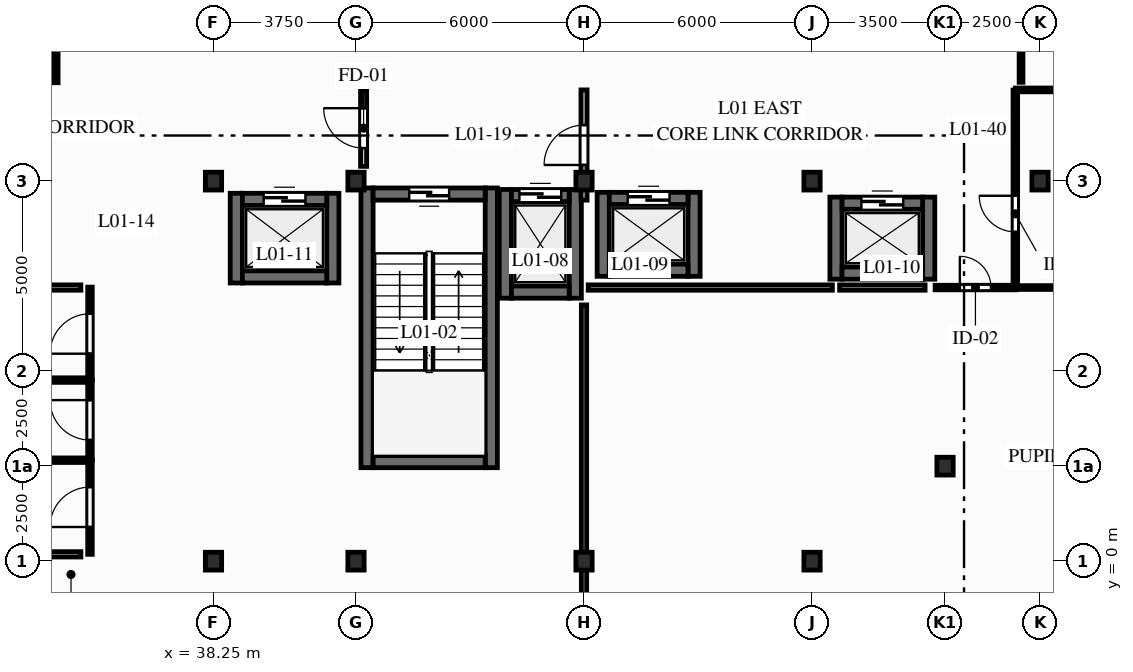
"""IFC4 building model, lengths in metres.
Left out: names, types, materials, properties, quantities, classifications, styles, units other than length and angle.
Written with IfcOpenShell. Run it as: python <this file> out.ifc"""

import sys

from ifc_helpers import new_model, si_unit, direction, frame, frame_2d, origin, origin_2d, place, context, subcontext, project, spatial, rectangle, i_section, extrude, element, fill, save


model = new_model("IFC4")
c1 = context("Model", 3, precision=1e-05, world=origin(), true_north=direction((0.0, 1.0)))
c2 = subcontext(c1, "Body", "Model", "MODEL_VIEW")
j1 = project(units=[si_unit("LENGTHUNIT", "METRE"), si_unit("PLANEANGLEUNIT", "RADIAN")], contexts=[c1])
p1 = place(None, origin())
s1 = spatial("IfcSite", under=j1, at=p1, CompositionType="ELEMENT")
p2 = place(p1, origin())
s2 = spatial("IfcBuilding", under=s1, at=p2, CompositionType="ELEMENT")
p3 = place(p2, frame((0.0, 0.0, 4.5)))
s3 = spatial("IfcBuildingStorey", under=s2, at=p3, CompositionType="ELEMENT", Elevation=4.5)
for number, where, z_axis, x_axis in (
    (1, (38.25, 0.0, 0.0), (0.0, 0.0, 1.0), (1.0, 0.0, 0.0)),
    (2, (38.25, 10.0, 0.0), (0.0, 0.0, 1.0), (1.0, 0.0, 0.0)),
    (3, (42.0, 0.0, 0.0), (0.0, 0.0, 1.0), (1.0, 0.0, 0.0)),
    (4, (42.0, 10.0, 0.0), (0.0, 0.0, 1.0), (1.0, 0.0, 0.0)),
    (5, (48.0, 0.0, 0.0), (0.0, 0.0, 1.0), (1.0, 0.0, 0.0)),
    (6, (48.0, 10.0, 0.0), (0.0, 0.0, 1.0), (1.0, 0.0, 0.0)),
    (7, (54.0, 0.0, 0.0), (0.0, 0.0, 1.0), (1.0, 0.0, 0.0)),
    (8, (54.0, 10.0, 0.0), (0.0, 0.0, 1.0), (1.0, 0.0, 0.0)),
    (9, (57.5, 2.5, 0.0), (0.0, 0.0, 1.0), (1.0, 0.0, 0.0)),
    (10, (60.0, 10.0, 0.0), (0.0, 0.0, 1.0), (1.0, 0.0, 0.0)),
):
    element("IfcColumn", number, at=place(p3, frame(where, z_axis=z_axis, x_axis=x_axis)), inside=s3, PredefinedType="COLUMN", context=c2, shape_type="SweptSolid", body=[
        extrude(i_section(OverallWidth=0.428, OverallDepth=0.469, WebThickness=0.078, FlangeThickness=0.125, FilletRadius=0.015, at=origin_2d()), origin(), (0.0, 0.0, 1.0), 4.5),
    ])
for number, where, z_axis, x_axis in (
    (11, (42.29, 2.46, 0.0), (0.0, 0.0, 1.0), (0.0, 1.0, 0.0)),
    (12, (45.56, 2.46, 0.0), (0.0, 0.0, 1.0), (0.0, 1.0, 0.0)),
):
    element("IfcWall", number, at=place(p3, frame(where, z_axis=z_axis, x_axis=x_axis)), inside=s3, PredefinedType="SHEAR", context=c2, shape_type="SweptSolid", body=[
        extrude(rectangle(XDim=7.36, YDim=0.32, at=frame_2d((3.68, 0.0))), origin(), (0.0, 0.0, 1.0), 4.22),
    ])
p4 = place(p3, frame((42.45, 2.62, 0.0), z_axis=(0.0, 0.0, 1.0), x_axis=(1.0, 0.0, 0.0)))
e13 = element("IfcWall", 13, at=p4, inside=s3, PredefinedType="SHEAR", context=c2, shape_type="SweptSolid", body=[
    extrude(rectangle(XDim=2.95, YDim=0.32, at=frame_2d((1.475, 0.0))), origin(), (0.0, 0.0, 1.0), 4.22),
])
p5 = place(p3, frame((45.4, 9.66, 0.0), z_axis=(0.0, 0.0, 1.0), x_axis=(-1.0, 0.0, 0.0)))
e14 = element("IfcWall", 14, at=p5, inside=s3, PredefinedType="SHEAR", context=c2, shape_type="SweptSolid", body=[
    extrude(rectangle(XDim=2.95, YDim=0.32, at=frame_2d((1.475, 0.0))), origin(), (0.0, 0.0, 1.0), 4.22),
])
p6 = place(p5, frame((0.95, 0.0, 0.0)))
e15 = element("IfcOpeningElement", 15, at=p6, cuts=e14, PredefinedType="OPENING", context=c2, shape_type="SweptSolid", body=[
    extrude(rectangle(XDim=1.05, YDim=2.06, at=frame_2d((0.525, 1.03))), frame((0.0, 0.17, 0.0), z_axis=(0.0, -1.0, 0.0), x_axis=(1.0, 0.0, 0.0)), (0.0, 0.0, 1.0), 0.34),
])
for number, where, z_axis, x_axis in (
    (16, (45.93, 6.92, 0.0), (0.0, 0.0, 1.0), (0.0, 1.0, 0.0)),
    (17, (47.77, 6.92, 0.0), (0.0, 0.0, 1.0), (0.0, 1.0, 0.0)),
):
    element("IfcWall", number, at=place(p3, frame(where, z_axis=z_axis, x_axis=x_axis)), inside=s3, PredefinedType="SHEAR", context=c2, shape_type="SweptSolid", body=[
        extrude(rectangle(XDim=2.86, YDim=0.32, at=frame_2d((1.43, 0.0))), origin(), (0.0, 0.0, 1.0), 4.22),
    ])
p7 = place(p3, frame((46.09, 7.08, 0.0), z_axis=(0.0, 0.0, 1.0), x_axis=(1.0, 0.0, 0.0)))
e18 = element("IfcWall", 18, at=p7, inside=s3, PredefinedType="SHEAR", context=c2, shape_type="SweptSolid", body=[
    extrude(rectangle(XDim=1.52, YDim=0.32, at=frame_2d((0.76, 0.0))), origin(), (0.0, 0.0, 1.0), 4.22),
])
p8 = place(p3, frame((46.09, 9.62, 0.0), z_axis=(0.0, 0.0, 1.0), x_axis=(1.0, 0.0, 0.0)))
e19 = element("IfcWall", 19, at=p8, inside=s3, PredefinedType="SHEAR", context=c2, shape_type="SweptSolid", body=[
    extrude(rectangle(XDim=1.52, YDim=0.32, at=frame_2d((0.76, 0.0))), origin(), (0.0, 0.0, 1.0), 4.22),
])
p9 = place(p8, frame((0.21, 0.0, 0.0)))
e20 = element("IfcOpeningElement", 20, at=p9, cuts=e19, PredefinedType="OPENING", context=c2, shape_type="SweptSolid", body=[
    extrude(rectangle(XDim=1.1, YDim=2.06, at=frame_2d((0.55, 1.03))), frame((0.0, 0.17, 0.0), z_axis=(0.0, -1.0, 0.0), x_axis=(1.0, 0.0, 0.0)), (0.0, 0.0, 1.0), 0.34),
])
for number, where, z_axis, x_axis in (
    (21, (48.505, 7.495, 0.0), (0.0, 0.0, 1.0), (0.0, 1.0, 0.0)),
    (22, (50.895, 7.495, 0.0), (0.0, 0.0, 1.0), (0.0, 1.0, 0.0)),
):
    element("IfcWall", number, at=place(p3, frame(where, z_axis=z_axis, x_axis=x_axis)), inside=s3, PredefinedType="SHEAR", context=c2, shape_type="SweptSolid", body=[
        extrude(rectangle(XDim=2.21, YDim=0.32, at=frame_2d((1.105, 0.0))), origin(), (0.0, 0.0, 1.0), 4.22),
    ])
p10 = place(p3, frame((48.665, 7.655, 0.0), z_axis=(0.0, 0.0, 1.0), x_axis=(1.0, 0.0, 0.0)))
e23 = element("IfcWall", 23, at=p10, inside=s3, PredefinedType="SHEAR", context=c2, shape_type="SweptSolid", body=[
    extrude(rectangle(XDim=2.07, YDim=0.32, at=frame_2d((1.035, 0.0))), origin(), (0.0, 0.0, 1.0), 4.22),
])
p11 = place(p3, frame((48.665, 9.545, 0.0), z_axis=(0.0, 0.0, 1.0), x_axis=(1.0, 0.0, 0.0)))
e24 = element("IfcWall", 24, at=p11, inside=s3, PredefinedType="SHEAR", context=c2, shape_type="SweptSolid", body=[
    extrude(rectangle(XDim=2.07, YDim=0.32, at=frame_2d((1.035, 0.0))), origin(), (0.0, 0.0, 1.0), 4.22),
])
p12 = place(p11, frame((0.485, 0.0, 0.0)))
e25 = element("IfcOpeningElement", 25, at=p12, cuts=e24, PredefinedType="OPENING", context=c2, shape_type="SweptSolid", body=[
    extrude(rectangle(XDim=1.1, YDim=2.06, at=frame_2d((0.55, 1.03))), frame((0.0, 0.17, 0.0), z_axis=(0.0, -1.0, 0.0), x_axis=(1.0, 0.0, 0.0)), (0.0, 0.0, 1.0), 0.34),
])
for number, where, z_axis, x_axis in (
    (26, (54.63, 7.42, 0.0), (0.0, 0.0, 1.0), (0.0, 1.0, 0.0)),
    (27, (57.07, 7.42, 0.0), (0.0, 0.0, 1.0), (0.0, 1.0, 0.0)),
):
    element("IfcWall", number, at=place(p3, frame(where, z_axis=z_axis, x_axis=x_axis)), inside=s3, PredefinedType="SHEAR", context=c2, shape_type="SweptSolid", body=[
        extrude(rectangle(XDim=2.16, YDim=0.32, at=frame_2d((1.08, 0.0))), origin(), (0.0, 0.0, 1.0), 4.22),
    ])
p13 = place(p3, frame((54.79, 7.58, 0.0), z_axis=(0.0, 0.0, 1.0), x_axis=(1.0, 0.0, 0.0)))
e28 = element("IfcWall", 28, at=p13, inside=s3, PredefinedType="SHEAR", context=c2, shape_type="SweptSolid", body=[
    extrude(rectangle(XDim=2.12, YDim=0.32, at=frame_2d((1.06, 0.0))), origin(), (0.0, 0.0, 1.0), 4.22),
])
p14 = place(p3, frame((54.79, 9.42, 0.0), z_axis=(0.0, 0.0, 1.0), x_axis=(1.0, 0.0, 0.0)))
e29 = element("IfcWall", 29, at=p14, inside=s3, PredefinedType="SHEAR", context=c2, shape_type="SweptSolid", body=[
    extrude(rectangle(XDim=2.12, YDim=0.32, at=frame_2d((1.06, 0.0))), origin(), (0.0, 0.0, 1.0), 4.22),
])
p15 = place(p14, frame((0.51, 0.0, 0.0)))
e30 = element("IfcOpeningElement", 30, at=p15, cuts=e29, PredefinedType="OPENING", context=c2, shape_type="SweptSolid", body=[
    extrude(rectangle(XDim=1.1, YDim=2.06, at=frame_2d((0.55, 1.03))), frame((0.0, 0.17, 0.0), z_axis=(0.0, -1.0, 0.0), x_axis=(1.0, 0.0, 0.0)), (0.0, 0.0, 1.0), 0.34),
])
for number, where, z_axis, x_axis in (
    (31, (38.85, 7.32, 0.0), (0.0, 0.0, 1.0), (0.0, 1.0, 0.0)),
    (32, (41.39, 7.32, 0.0), (0.0, 0.0, 1.0), (0.0, 1.0, 0.0)),
):
    element("IfcWall", number, at=place(p3, frame(where, z_axis=z_axis, x_axis=x_axis)), inside=s3, PredefinedType="SHEAR", context=c2, shape_type="SweptSolid", body=[
        extrude(rectangle(XDim=2.36, YDim=0.32, at=frame_2d((1.18, 0.0))), origin(), (0.0, 0.0, 1.0), 4.22),
    ])
p16 = place(p3, frame((39.01, 7.48, 0.0), z_axis=(0.0, 0.0, 1.0), x_axis=(1.0, 0.0, 0.0)))
e33 = element("IfcWall", 33, at=p16, inside=s3, PredefinedType="SHEAR", context=c2, shape_type="SweptSolid", body=[
    extrude(rectangle(XDim=2.22, YDim=0.32, at=frame_2d((1.11, 0.0))), origin(), (0.0, 0.0, 1.0), 4.22),
])
p17 = place(p3, frame((39.01, 9.52, 0.0), z_axis=(0.0, 0.0, 1.0), x_axis=(1.0, 0.0, 0.0)))
e34 = element("IfcWall", 34, at=p17, inside=s3, PredefinedType="SHEAR", context=c2, shape_type="SweptSolid", body=[
    extrude(rectangle(XDim=2.22, YDim=0.32, at=frame_2d((1.11, 0.0))), origin(), (0.0, 0.0, 1.0), 4.22),
])
p18 = place(p17, frame((0.56, 0.0, 0.0)))
e35 = element("IfcOpeningElement", 35, at=p18, cuts=e34, PredefinedType="OPENING", context=c2, shape_type="SweptSolid", body=[
    extrude(rectangle(XDim=1.1, YDim=2.06, at=frame_2d((0.55, 1.03))), frame((0.0, 0.17, 0.0), z_axis=(0.0, -1.0, 0.0), x_axis=(1.0, 0.0, 0.0)), (0.0, 0.0, 1.0), 0.34),
])
p19 = place(p3, frame((35.0, 0.18, 0.0), z_axis=(0.0, 0.0, 1.0), x_axis=(0.0, 1.0, 0.0)))
e36 = element("IfcWall", 36, at=p19, inside=s3, PredefinedType="PARTITIONING", context=c2, shape_type="SweptSolid", body=[
    extrude(rectangle(XDim=2.488, YDim=0.12, at=frame_2d((1.244, 0.0))), origin(), (0.0, 0.0, 1.0), 4.22),
])
p20 = place(p19, frame((0.719, 0.0, 0.0)))
e37 = element("IfcOpeningElement", 37, at=p20, cuts=e36, PredefinedType="OPENING", context=c2, shape_type="SweptSolid", body=[
    extrude(rectangle(XDim=1.05, YDim=2.06, at=frame_2d((0.525, 1.03))), frame((0.0, 0.07, 0.0), z_axis=(0.0, -1.0, 0.0), x_axis=(1.0, 0.0, 0.0)), (0.0, 0.0, 1.0), 0.14),
])
p21 = place(p3, frame((35.0, 2.65, 0.0), z_axis=(0.0, 0.0, 1.0), x_axis=(0.0, 1.0, 0.0)))
e38 = element("IfcWall", 38, at=p21, inside=s3, PredefinedType="PARTITIONING", context=c2, shape_type="SweptSolid", body=[
    extrude(rectangle(XDim=2.127, YDim=0.12, at=frame_2d((1.063, 0.0))), origin(), (0.0, 0.0, 1.0), 4.22),
])
p22 = place(p21, frame((0.538, 0.0, 0.0)))
e39 = element("IfcOpeningElement", 39, at=p22, cuts=e38, PredefinedType="OPENING", context=c2, shape_type="SweptSolid", body=[
    extrude(rectangle(XDim=1.05, YDim=2.06, at=frame_2d((0.525, 1.03))), frame((0.0, 0.07, 0.0), z_axis=(0.0, -1.0, 0.0), x_axis=(1.0, 0.0, 0.0)), (0.0, 0.0, 1.0), 0.14),
])
p23 = place(p3, frame((35.0, 4.758, 0.0), z_axis=(0.0, 0.0, 1.0), x_axis=(0.0, 1.0, 0.0)))
e40 = element("IfcWall", 40, at=p23, inside=s3, PredefinedType="PARTITIONING", context=c2, shape_type="SweptSolid", body=[
    extrude(rectangle(XDim=2.453, YDim=0.12, at=frame_2d((1.227, 0.0))), origin(), (0.0, 0.0, 1.0), 3.738),
])
p24 = place(p23, frame((0.702, 0.0, 0.0)))
e41 = element("IfcOpeningElement", 41, at=p24, cuts=e40, PredefinedType="OPENING", context=c2, shape_type="SweptSolid", body=[
    extrude(rectangle(XDim=1.05, YDim=2.06, at=frame_2d((0.525, 1.03))), frame((0.0, 0.07, 0.0), z_axis=(0.0, -1.0, 0.0), x_axis=(1.0, 0.0, 0.0)), (0.0, 0.0, 1.0), 0.14),
])
for number, where, z_axis, x_axis in (
    (42, (21.95, 2.657, 0.0), (0.0, 0.0, 1.0), (1.0, 0.0, 0.0)),
    (43, (21.95, 4.765, 0.0), (0.0, 0.0, 1.0), (1.0, 0.0, 0.0)),
):
    element("IfcWall", number, at=place(p3, frame(where, z_axis=z_axis, x_axis=x_axis)), inside=s3, PredefinedType="PARTITIONING", context=c2, shape_type="SweptSolid", body=[
        extrude(rectangle(XDim=13.046, YDim=0.12, at=frame_2d((6.523, 0.0))), origin(), (0.0, 0.0, 1.0), 4.22),
    ])
p25 = place(p3, frame((42.2, 10.389, 0.0), z_axis=(0.0, 0.0, 1.0), x_axis=(0.0, 1.0, 0.0)))
e44 = element("IfcWall", 44, at=p25, inside=s3, PredefinedType="PARTITIONING", context=c2, shape_type="SweptSolid", body=[
    extrude(rectangle(XDim=2.011, YDim=0.16, at=frame_2d((1.006, 0.0))), origin(), (0.0, 0.0, 1.0), 4.22),
])
p26 = place(p25, frame((0.481, 0.0, 0.0)))
e45 = element("IfcOpeningElement", 45, at=p26, cuts=e44, PredefinedType="OPENING", context=c2, shape_type="SweptSolid", body=[
    extrude(rectangle(XDim=1.05, YDim=2.06, at=frame_2d((0.525, 1.03))), frame((0.0, 0.09, 0.0), z_axis=(0.0, -1.0, 0.0), x_axis=(1.0, 0.0, 0.0)), (0.0, 0.0, 1.0), 0.18),
])
p27 = place(p3, frame((48.0, 9.5, 0.0), z_axis=(0.0, 0.0, 1.0), x_axis=(0.0, 1.0, 0.0)))
e46 = element("IfcWall", 46, at=p27, inside=s3, PredefinedType="PARTITIONING", context=c2, shape_type="SweptSolid", body=[
    extrude(rectangle(XDim=2.9, YDim=0.16, at=frame_2d((1.45, 0.0))), origin(), (0.0, 0.0, 1.0), 3.268),
])
p28 = place(p27, frame((0.925, 0.0, 0.0)))
e47 = element("IfcOpeningElement", 47, at=p28, cuts=e46, PredefinedType="OPENING", context=c2, shape_type="SweptSolid", body=[
    extrude(rectangle(XDim=1.05, YDim=2.06, at=frame_2d((0.525, 1.03))), frame((0.0, 0.09, 0.0), z_axis=(0.0, -1.0, 0.0), x_axis=(1.0, 0.0, 0.0)), (0.0, 0.0, 1.0), 0.18),
])
p29 = place(p3, frame((34.1, 12.589, 0.0), z_axis=(0.0, 0.0, 1.0), x_axis=(0.0, 1.0, 0.0)))
e48 = element("IfcWall", 48, at=p29, inside=s3, PredefinedType="PARTITIONING", context=c2, shape_type="SweptSolid", body=[
    extrude(rectangle(XDim=17.823, YDim=0.12, at=frame_2d((8.911, 0.0))), origin(), (0.0, 0.0, 1.0), 4.22),
])
p30 = place(p29, frame((8.386, 0.0, 0.0)))
e49 = element("IfcOpeningElement", 49, at=p30, cuts=e48, PredefinedType="OPENING", context=c2, shape_type="SweptSolid", body=[
    extrude(rectangle(XDim=1.05, YDim=2.06, at=frame_2d((0.525, 1.03))), frame((0.0, 0.07, 0.0), z_axis=(0.0, -1.0, 0.0), x_axis=(1.0, 0.0, 0.0)), (0.0, 0.0, 1.0), 0.14),
])
p31 = place(p3, frame((59.5, 12.6, 0.0), z_axis=(0.0, 0.0, 1.0), x_axis=(0.0, 1.0, 0.0)))
e50 = element("IfcWall", 50, at=p31, inside=s3, PredefinedType="PARTITIONING", context=c2, shape_type="SweptSolid", body=[
    extrude(rectangle(XDim=14.5, YDim=0.1, at=frame_2d((7.25, 0.0))), origin(), (0.0, 0.0, 1.0), 4.22),
])
p32 = place(p3, frame((59.35, 12.4, 0.0), z_axis=(0.0, 0.0, 1.0), x_axis=(1.0, 0.0, 0.0)))
e51 = element("IfcWall", 51, at=p32, inside=s3, PredefinedType="PARTITIONING", context=c2, shape_type="SweptSolid", body=[
    extrude(rectangle(XDim=11.45, YDim=0.1, at=frame_2d((5.725, 0.0))), origin(), (0.0, 0.0, 1.0), 3.268),
])
p33 = place(p3, frame((57.239, 7.2, 0.0), z_axis=(0.0, 0.0, 1.0), x_axis=(1.0, 0.0, 0.0)))
e52 = element("IfcWall", 52, at=p33, inside=s3, PredefinedType="PARTITIONING", context=c2, shape_type="SweptSolid", body=[
    extrude(rectangle(XDim=2.123, YDim=0.12, at=frame_2d((1.061, 0.0))), origin(), (0.0, 0.0, 1.0), 4.22),
])
p34 = place(p33, frame((0.651, 0.0, 0.0)))
e53 = element("IfcOpeningElement", 53, at=p34, cuts=e52, PredefinedType="OPENING", context=c2, shape_type="SweptSolid", body=[
    extrude(rectangle(XDim=0.82, YDim=2.02, at=frame_2d((0.41, 1.01))), frame((0.0, 0.07, 0.0), z_axis=(0.0, -1.0, 0.0), x_axis=(1.0, 0.0, 0.0)), (0.0, 0.0, 1.0), 0.14),
])
p35 = place(p3, frame((59.343, 7.2, 0.0), z_axis=(0.0, 0.0, 1.0), x_axis=(1.0, 0.0, 0.0)))
e54 = element("IfcWall", 54, at=p35, inside=s3, PredefinedType="PARTITIONING", context=c2, shape_type="SweptSolid", body=[
    extrude(rectangle(XDim=11.457, YDim=0.1, at=frame_2d((5.729, 0.0))), origin(), (0.0, 0.0, 1.0), 3.268),
])
p36 = place(p3, frame((59.35, 7.204, 0.0), z_axis=(0.0, 0.0, 1.0), x_axis=(0.0, 1.0, 0.0)))
e55 = element("IfcWall", 55, at=p36, inside=s3, PredefinedType="PARTITIONING", context=c2, shape_type="SweptSolid", body=[
    extrude(rectangle(XDim=5.192, YDim=0.12, at=frame_2d((2.596, 0.0))), origin(), (0.0, 0.0, 1.0), 3.268),
])
p37 = place(p36, frame((1.461, 0.0, 0.0)))
e56 = element("IfcOpeningElement", 56, at=p37, cuts=e55, PredefinedType="OPENING", context=c2, shape_type="SweptSolid", body=[
    extrude(rectangle(XDim=0.95, YDim=2.05, at=frame_2d((0.475, 1.025))), frame((0.0, 0.07, 0.0), z_axis=(0.0, -1.0, 0.0), x_axis=(1.0, 0.0, 0.0)), (0.0, 0.0, 1.0), 0.14),
])
p38 = place(p3, frame((21.95, 0.18, 0.0), z_axis=(0.0, 0.0, 1.0), x_axis=(1.0, 0.0, 0.0)))
e57 = element("IfcWall", 57, at=p38, inside=s3, PredefinedType="PARTITIONING", context=c2, shape_type="SweptSolid", body=[
    extrude(rectangle(XDim=12.81, YDim=0.14, at=frame_2d((6.405, 0.0))), origin(), (0.0, 0.0, 1.0), 3.583),
])
p39 = place(p3, frame((21.95, 7.2, 0.0), z_axis=(0.0, 0.0, 1.0), x_axis=(1.0, 0.0, 0.0)))
e58 = element("IfcWall", 58, at=p39, inside=s3, PredefinedType="PARTITIONING", context=c2, shape_type="SweptSolid", body=[
    extrude(rectangle(XDim=12.81, YDim=0.14, at=frame_2d((6.405, 0.0))), origin(), (0.0, 0.0, 1.0), 4.22),
])
p40 = place(p3, frame((54.726, 7.2, 0.0), z_axis=(0.0, 0.0, 1.0), x_axis=(1.0, 0.0, 0.0)))
e59 = element("IfcWall", 59, at=p40, inside=s3, PredefinedType="PARTITIONING", context=c2, shape_type="SweptSolid", body=[
    extrude(rectangle(XDim=2.249, YDim=0.14, at=frame_2d((1.125, 0.0))), origin(), (0.0, 0.0, 1.0), 4.22),
])
p41 = place(p3, frame((48.11, 7.2, 0.0), z_axis=(0.0, 0.0, 1.0), x_axis=(1.0, 0.0, 0.0)))
e60 = element("IfcWall", 60, at=p41, inside=s3, PredefinedType="PARTITIONING", context=c2, shape_type="SweptSolid", body=[
    extrude(rectangle(XDim=6.424, YDim=0.14, at=frame_2d((3.212, 0.0))), origin(), (0.0, 0.0, 1.0), 3.268),
])
p42 = place(p3, frame((48.0, -1.59, 0.0), z_axis=(0.0, 0.0, 1.0), x_axis=(0.0, 1.0, 0.0)))
e61 = element("IfcWall", 61, at=p42, inside=s3, PredefinedType="PARTITIONING", context=c2, shape_type="SweptSolid", body=[
    extrude(rectangle(XDim=8.333, YDim=0.14, at=frame_2d((4.167, 0.0))), origin(), (0.0, 0.0, 1.0), 3.268),
])
p43 = place(p6, origin())
e62 = element("IfcDoor", 62, at=p43, inside=s3, OperationType="SINGLE_SWING_RIGHT", PredefinedType="DOOR", context=c2, shape_type="SweptSolid", body=[
    extrude(rectangle(XDim=1.05, YDim=2.06, at=frame_2d((0.525, 1.03))), frame((0.0, 0.025, 0.0), z_axis=(0.0, -1.0, 0.0), x_axis=(1.0, 0.0, 0.0)), (0.0, 0.0, 1.0), 0.05),
])
fill(e15, e62)
p44 = place(p9, origin())
e63 = element("IfcDoor", 63, at=p44, inside=s3, OperationType="SLIDING_TO_RIGHT", PredefinedType="DOOR", context=c2, shape_type="SweptSolid", body=[
    extrude(rectangle(XDim=1.1, YDim=2.06, at=frame_2d((0.55, 1.03))), frame((0.0, 0.025, 0.0), z_axis=(0.0, -1.0, 0.0), x_axis=(1.0, 0.0, 0.0)), (0.0, 0.0, 1.0), 0.05),
])
fill(e20, e63)
p45 = place(p12, origin())
e64 = element("IfcDoor", 64, at=p45, inside=s3, OperationType="SLIDING_TO_LEFT", PredefinedType="DOOR", context=c2, shape_type="SweptSolid", body=[
    extrude(rectangle(XDim=1.1, YDim=2.06, at=frame_2d((0.55, 1.03))), frame((0.0, 0.025, 0.0), z_axis=(0.0, -1.0, 0.0), x_axis=(1.0, 0.0, 0.0)), (0.0, 0.0, 1.0), 0.05),
])
fill(e25, e64)
p46 = place(p15, origin())
e65 = element("IfcDoor", 65, at=p46, inside=s3, OperationType="SLIDING_TO_RIGHT", PredefinedType="DOOR", context=c2, shape_type="SweptSolid", body=[
    extrude(rectangle(XDim=1.1, YDim=2.06, at=frame_2d((0.55, 1.03))), frame((0.0, 0.025, 0.0), z_axis=(0.0, -1.0, 0.0), x_axis=(1.0, 0.0, 0.0)), (0.0, 0.0, 1.0), 0.05),
])
fill(e30, e65)
p47 = place(p18, origin())
e66 = element("IfcDoor", 66, at=p47, inside=s3, OperationType="SLIDING_TO_LEFT", PredefinedType="DOOR", context=c2, shape_type="SweptSolid", body=[
    extrude(rectangle(XDim=1.1, YDim=2.06, at=frame_2d((0.55, 1.03))), frame((0.0, 0.025, 0.0), z_axis=(0.0, -1.0, 0.0), x_axis=(1.0, 0.0, 0.0)), (0.0, 0.0, 1.0), 0.05),
])
fill(e35, e66)
p48 = place(p20, origin())
e67 = element("IfcDoor", 67, at=p48, inside=s3, OperationType="SINGLE_SWING_LEFT", PredefinedType="DOOR", context=c2, shape_type="SweptSolid", body=[
    extrude(rectangle(XDim=1.05, YDim=2.06, at=frame_2d((0.525, 1.03))), frame((0.0, 0.025, 0.0), z_axis=(0.0, -1.0, 0.0), x_axis=(1.0, 0.0, 0.0)), (0.0, 0.0, 1.0), 0.05),
])
fill(e37, e67)
p49 = place(p22, origin())
e68 = element("IfcDoor", 68, at=p49, inside=s3, OperationType="SINGLE_SWING_RIGHT", PredefinedType="DOOR", context=c2, shape_type="SweptSolid", body=[
    extrude(rectangle(XDim=1.05, YDim=2.06, at=frame_2d((0.525, 1.03))), frame((0.0, 0.025, 0.0), z_axis=(0.0, -1.0, 0.0), x_axis=(1.0, 0.0, 0.0)), (0.0, 0.0, 1.0), 0.05),
])
fill(e39, e68)
p50 = place(p24, origin())
e69 = element("IfcDoor", 69, at=p50, inside=s3, OperationType="SINGLE_SWING_LEFT", PredefinedType="DOOR", context=c2, shape_type="SweptSolid", body=[
    extrude(rectangle(XDim=1.05, YDim=2.06, at=frame_2d((0.525, 1.03))), frame((0.0, 0.025, 0.0), z_axis=(0.0, -1.0, 0.0), x_axis=(1.0, 0.0, 0.0)), (0.0, 0.0, 1.0), 0.05),
])
fill(e41, e69)
p51 = place(p26, origin())
e70 = element("IfcDoor", 70, at=p51, inside=s3, OperationType="SINGLE_SWING_RIGHT", PredefinedType="DOOR", context=c2, shape_type="SweptSolid", body=[
    extrude(rectangle(XDim=1.05, YDim=2.06, at=frame_2d((0.525, 1.03))), frame((0.0, 0.025, 0.0), z_axis=(0.0, -1.0, 0.0), x_axis=(1.0, 0.0, 0.0)), (0.0, 0.0, 1.0), 0.05),
])
fill(e45, e70)
p52 = place(p28, origin())
e71 = element("IfcDoor", 71, at=p52, inside=s3, OperationType="SINGLE_SWING_LEFT", PredefinedType="DOOR", context=c2, shape_type="SweptSolid", body=[
    extrude(rectangle(XDim=1.05, YDim=2.06, at=frame_2d((0.525, 1.03))), frame((0.0, 0.025, 0.0), z_axis=(0.0, -1.0, 0.0), x_axis=(1.0, 0.0, 0.0)), (0.0, 0.0, 1.0), 0.05),
])
fill(e47, e71)
p53 = place(p34, origin())
e72 = element("IfcDoor", 72, at=p53, inside=s3, OperationType="SINGLE_SWING_LEFT", PredefinedType="DOOR", context=c2, shape_type="SweptSolid", body=[
    extrude(rectangle(XDim=0.82, YDim=2.02, at=frame_2d((0.41, 1.01))), frame((0.0, 0.025, 0.0), z_axis=(0.0, -1.0, 0.0), x_axis=(1.0, 0.0, 0.0)), (0.0, 0.0, 1.0), 0.05),
])
fill(e53, e72)
p54 = place(p37, origin())
e73 = element("IfcDoor", 73, at=p54, inside=s3, OperationType="SINGLE_SWING_RIGHT", PredefinedType="DOOR", context=c2, shape_type="SweptSolid", body=[
    extrude(rectangle(XDim=0.95, YDim=2.05, at=frame_2d((0.475, 1.025))), frame((0.0, 0.025, 0.0), z_axis=(0.0, -1.0, 0.0), x_axis=(1.0, 0.0, 0.0)), (0.0, 0.0, 1.0), 0.05),
])
fill(e56, e73)
save(model, sys.argv[1])
